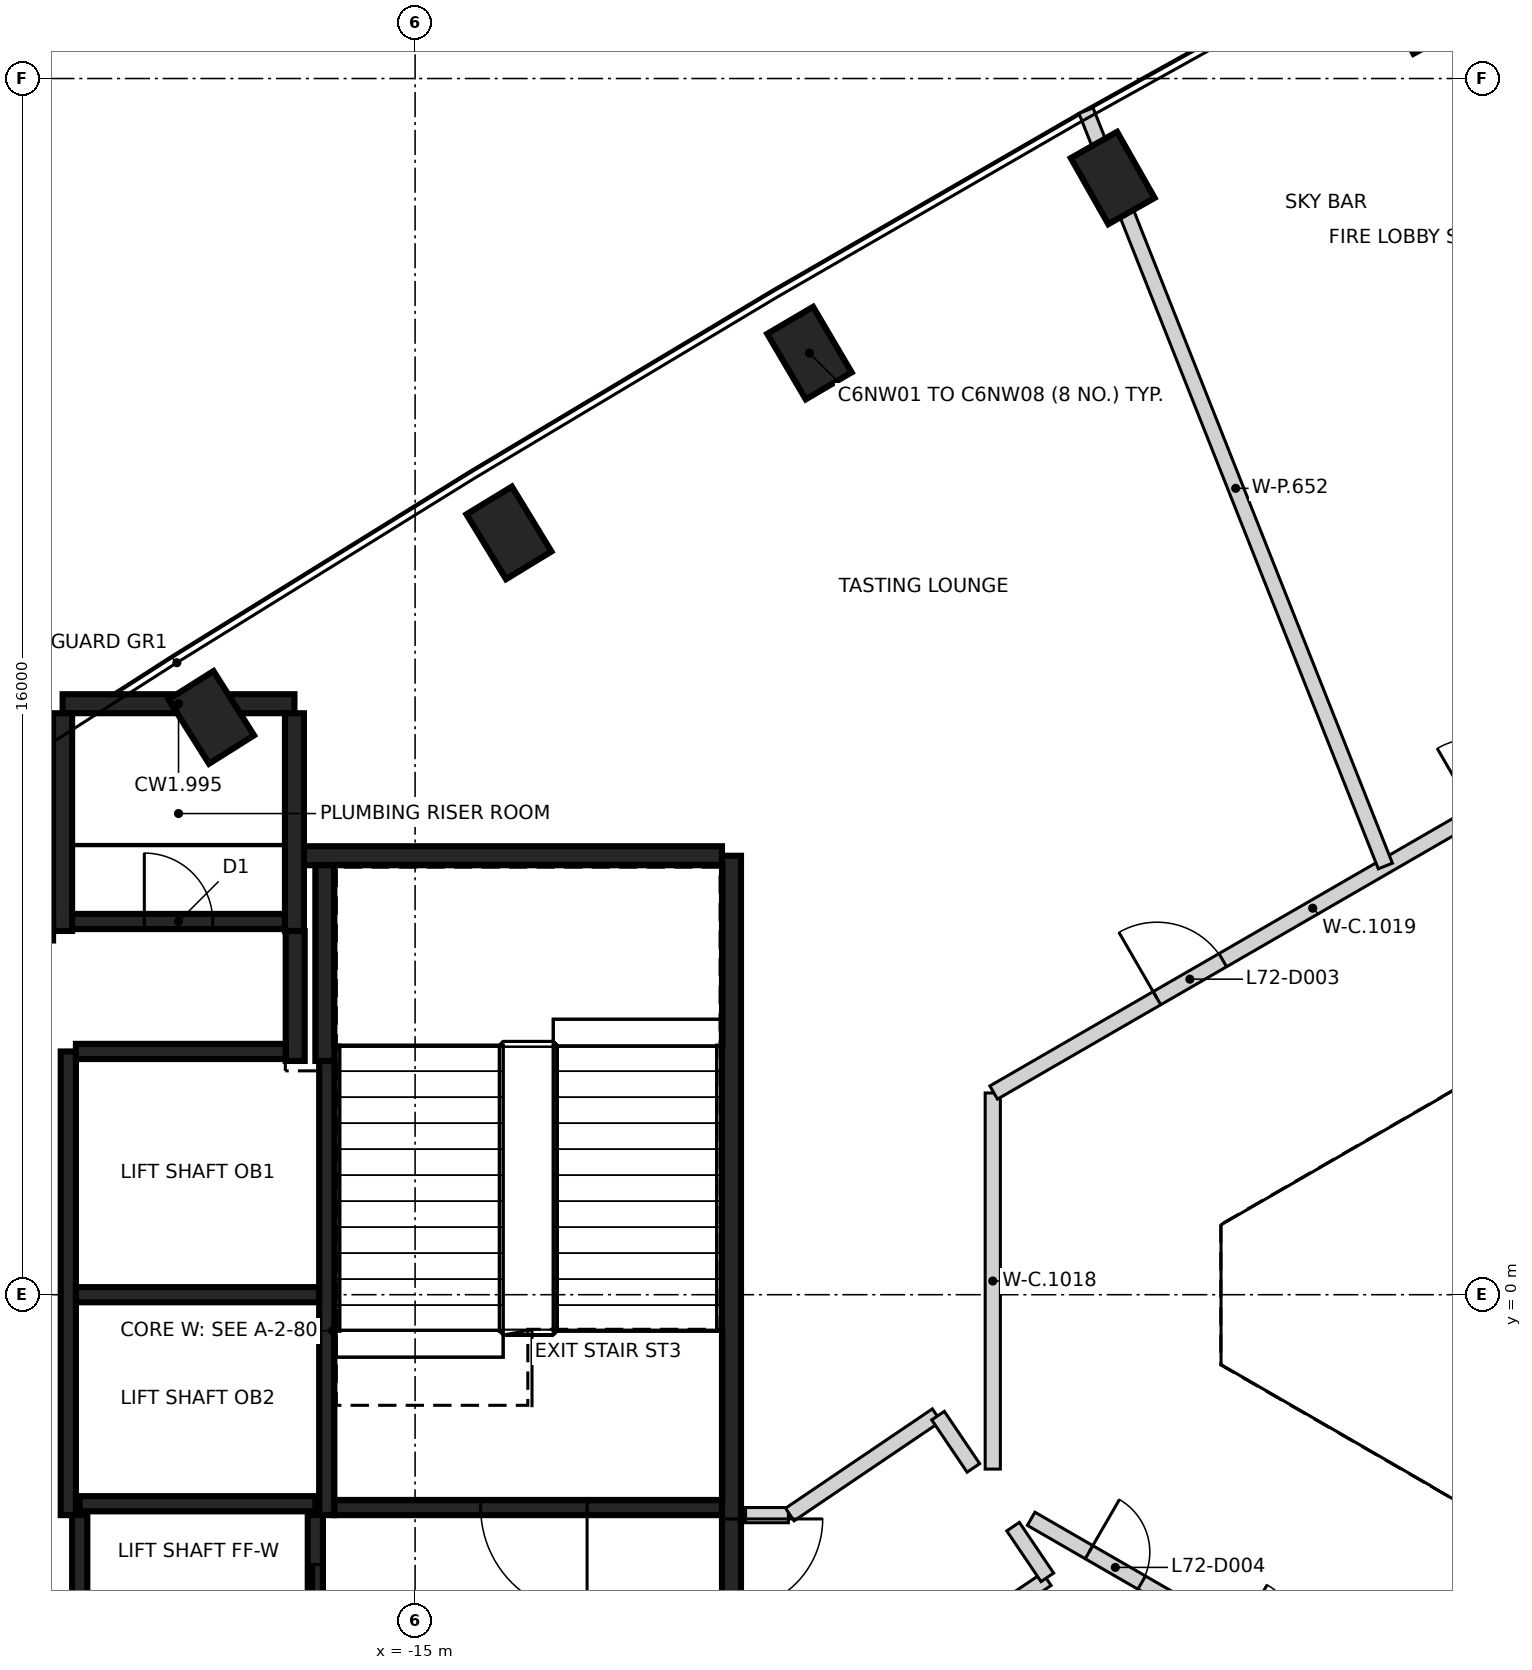
"""IFC4 building model, lengths in metres.
Left out: names, types, materials, properties, quantities, classifications, styles, units other than length and angle.
Written with IfcOpenShell. Run it as: python <this file> out.ifc"""

import sys

from ifc_helpers import new_model, si_unit, direction, frame, frame_2d, origin, origin_2d, place, context, subcontext, project, spatial, rectangle, extrude, element, fill, save


model = new_model("IFC4")
c1 = context("Model", 3, precision=1e-05, world=origin(), true_north=direction((0.0, 1.0)))
c2 = subcontext(c1, "Body", "Model", "MODEL_VIEW")
j1 = project(units=[si_unit("LENGTHUNIT", "METRE"), si_unit("PLANEANGLEUNIT", "RADIAN")], contexts=[c1])
p1 = place(None, origin())
s1 = spatial("IfcSite", under=j1, at=p1, CompositionType="ELEMENT")
p2 = place(p1, origin())
s2 = spatial("IfcBuilding", under=s1, at=p2, CompositionType="ELEMENT")
p3 = place(p2, frame((0.0, 0.0, 283.8)))
s3 = spatial("IfcBuildingStorey", under=s2, at=p3, CompositionType="ELEMENT", Elevation=283.8)
for number, where, z_axis, x_axis in (
    (1, (-1.797, 16.932, -0.35), (0.0, 0.0, 1.0), (-0.479, 0.878, 0.0)),
    (2, (-5.822, 14.691, -0.35), (0.0, 0.0, 1.0), (-0.493, 0.87, 0.0)),
    (3, (-9.812, 12.388, -0.35), (0.0, 0.0, 1.0), (-0.507, 0.862, 0.0)),
    (4, (-13.765, 10.022, -0.35), (0.0, 0.0, 1.0), (-0.52, 0.854, 0.0)),
    (5, (-17.681, 7.595, -0.35), (0.0, 0.0, 1.0), (-0.533, 0.846, 0.0)),
):
    element("IfcColumn", number, at=place(p3, frame(where, z_axis=z_axis, x_axis=x_axis)), inside=s3, PredefinedType="COLUMN", context=c2, shape_type="SweptSolid", body=[
        extrude(rectangle(XDim=1.0, YDim=0.7, at=origin_2d()), origin(), (0.0, 0.0, 1.0), 7.2),
    ])
p4 = place(p3, frame((-10.837, 5.775, 0.0), z_axis=(0.0, 0.0, 1.0), x_axis=(0.0, -1.0, 0.0)))
e6 = element("IfcWall", 6, at=p4, inside=s3, PredefinedType="SHEAR", context=c2, shape_type="SweptSolid", body=[
    extrude(rectangle(XDim=11.55, YDim=0.25, at=frame_2d((5.775, 0.0))), origin(), (0.0, 0.0, 1.0), 6.85),
])
p5 = place(p4, frame((10.025, 0.0, 0.0)))
e7 = element("IfcOpeningElement", 7, at=p5, cuts=e6, PredefinedType="OPENING", context=c2, shape_type="SweptSolid", body=[
    extrude(rectangle(XDim=1.2, YDim=2.1, at=frame_2d((0.6, 1.05))), frame((0.0, 0.135, 0.0), z_axis=(0.0, -1.0, 0.0), x_axis=(1.0, 0.0, 0.0)), (0.0, 0.0, 1.0), 0.27),
])
p6 = place(p4, frame((8.725, 0.0, 0.0)))
e8 = element("IfcOpeningElement", 8, at=p6, cuts=e6, PredefinedType="OPENING", context=c2, shape_type="SweptSolid", body=[
    extrude(rectangle(XDim=1.2, YDim=2.1, at=frame_2d((0.6, 1.05))), frame((0.0, 0.135, 0.0), z_axis=(0.0, -1.0, 0.0), x_axis=(1.0, 0.0, 0.0)), (0.0, 0.0, 1.0), 0.27),
])
p7 = place(p3, frame((-16.472, 5.775, 0.0), z_axis=(0.0, 0.0, 1.0), x_axis=(1.0, 0.0, 0.0)))
e9 = element("IfcWall", 9, at=p7, inside=s3, PredefinedType="SHEAR", context=c2, shape_type="SweptSolid", body=[
    extrude(rectangle(XDim=5.51, YDim=0.25, at=frame_2d((2.755, 0.0))), origin(), (0.0, 0.0, 1.0), 6.85),
])
p8 = place(p3, frame((-19.637, 7.775, 0.0), z_axis=(0.0, 0.0, 1.0), x_axis=(1.0, 0.0, 0.0)))
e10 = element("IfcWall", 10, at=p8, inside=s3, PredefinedType="SHEAR", context=c2, shape_type="SweptSolid", body=[
    extrude(rectangle(XDim=3.05, YDim=0.25, at=frame_2d((1.525, 0.0))), origin(), (0.0, 0.0, 1.0), 6.85),
])
for number, where, z_axis, x_axis in (
    (11, (-16.587, 7.65, 0.0), (0.0, 0.0, 1.0), (0.0, -1.0, 0.0)),
    (12, (-19.637, 4.785, 0.0), (0.0, 0.0, 1.0), (0.0, 1.0, 0.0)),
):
    element("IfcWall", number, at=place(p3, frame(where, z_axis=z_axis, x_axis=x_axis)), inside=s3, PredefinedType="SHEAR", context=c2, shape_type="SweptSolid", body=[
        extrude(rectangle(XDim=2.865, YDim=0.25, at=frame_2d((1.432, 0.0))), origin(), (0.0, 0.0, 1.0), 6.85),
    ])
p9 = place(p3, frame((-16.187, 3.075, 0.0), z_axis=(0.0, 0.0, 1.0), x_axis=(0.0, 1.0, 0.0)))
e13 = element("IfcWall", 13, at=p9, inside=s3, PredefinedType="SHEAR", context=c2, shape_type="SweptSolid", body=[
    extrude(rectangle(XDim=2.575, YDim=0.25, at=frame_2d((1.287, 0.0))), origin(), (0.0, 0.0, 1.0), 6.85),
])
p10 = place(p3, frame((-16.577, 4.785, 0.0), z_axis=(0.0, 0.0, 1.0), x_axis=(0.0, -1.0, 0.0)))
e14 = element("IfcWall", 14, at=p10, inside=s3, PredefinedType="SHEAR", context=c2, shape_type="SweptSolid", body=[
    extrude(rectangle(XDim=1.71, YDim=0.25, at=frame_2d((0.855, 0.0))), origin(), (0.0, 0.0, 1.0), 6.85),
])
p11 = place(p3, frame((-20.322, 4.785, 0.0), z_axis=(0.0, 0.0, 1.0), x_axis=(1.0, 0.0, 0.0)))
e15 = element("IfcWall", 15, at=p11, inside=s3, PredefinedType="SHEAR", context=c2, shape_type="SweptSolid", body=[
    extrude(rectangle(XDim=0.559, YDim=0.25, at=frame_2d((0.28, 0.0))), origin(), (0.0, 0.0, 1.0), 6.85),
])
p12 = place(p3, frame((-16.162, 3.074, 0.0), z_axis=(0.0, 0.0, 1.0), x_axis=(0.0, -1.0, 0.0)))
e16 = element("IfcWall", 16, at=p12, inside=s3, PredefinedType="SHEAR", context=c2, shape_type="SweptSolid", body=[
    extrude(rectangle(XDim=5.974, YDim=0.2, at=frame_2d((2.987, 0.0))), origin(), (0.0, 0.0, 1.0), 6.85),
])
p13 = place(p3, frame((-19.562, -2.9, 0.0), z_axis=(0.0, 0.0, 1.0), x_axis=(0.0, 1.0, 0.0)))
e17 = element("IfcWall", 17, at=p13, inside=s3, PredefinedType="SHEAR", context=c2, shape_type="SweptSolid", body=[
    extrude(rectangle(XDim=6.1, YDim=0.2, at=frame_2d((3.05, 0.0))), origin(), (0.0, 0.0, 1.0), 6.85),
])
p14 = place(p3, frame((-10.963, -2.8, 0.0), z_axis=(0.0, 0.0, 1.0), x_axis=(-1.0, 0.0, 0.0)))
e18 = element("IfcWall", 18, at=p14, inside=s3, PredefinedType="SHEAR", context=c2, shape_type="SweptSolid", body=[
    extrude(rectangle(XDim=5.098, YDim=0.2, at=frame_2d((2.549, 0.0))), origin(), (0.0, 0.0, 1.0), 6.85),
])
p15 = place(p14, frame((1.774, 0.0, 0.0)))
e19 = element("IfcOpeningElement", 19, at=p15, cuts=e18, PredefinedType="OPENING", context=c2, shape_type="SweptSolid", body=[
    extrude(rectangle(XDim=1.4, YDim=2.1, at=frame_2d((0.7, 1.05))), frame((0.0, 0.11, 0.0), z_axis=(0.0, -1.0, 0.0), x_axis=(1.0, 0.0, 0.0)), (0.0, 0.0, 1.0), 0.22),
])
p16 = place(p3, frame((-16.263, 0.0, 0.0), z_axis=(0.0, 0.0, 1.0), x_axis=(-1.0, 0.0, 0.0)))
e20 = element("IfcWall", 20, at=p16, inside=s3, PredefinedType="SHEAR", context=c2, shape_type="SweptSolid", body=[
    extrude(rectangle(XDim=3.198, YDim=0.2, at=frame_2d((1.599, 0.0))), origin(), (0.0, 0.0, 1.0), 6.85),
])
p17 = place(p3, frame((-19.511, 4.91, 0.0), z_axis=(0.0, 0.0, 1.0), x_axis=(1.0, 0.0, 0.0)))
e21 = element("IfcWall", 21, at=p17, inside=s3, PredefinedType="SHEAR", context=c2, shape_type="SweptSolid", body=[
    extrude(rectangle(XDim=2.798, YDim=0.2, at=frame_2d((1.399, 0.0))), origin(), (0.0, 0.0, 1.0), 6.85),
])
p18 = place(p17, frame((0.949, 0.0, 0.0)))
e22 = element("IfcOpeningElement", 22, at=p18, cuts=e21, PredefinedType="OPENING", context=c2, shape_type="SweptSolid", body=[
    extrude(rectangle(XDim=0.9, YDim=2.1, at=frame_2d((0.45, 1.05))), frame((0.0, 0.11, 0.0), z_axis=(0.0, -1.0, 0.0), x_axis=(1.0, 0.0, 0.0)), (0.0, 0.0, 1.0), 0.22),
])
p19 = place(p3, frame((-19.462, 3.2, 0.0), z_axis=(0.0, 0.0, 1.0), x_axis=(1.0, 0.0, 0.0)))
e23 = element("IfcWall", 23, at=p19, inside=s3, PredefinedType="SHEAR", context=c2, shape_type="SweptSolid", body=[
    extrude(rectangle(XDim=2.759, YDim=0.2, at=frame_2d((1.379, 0.0))), origin(), (0.0, 0.0, 1.0), 6.85),
])
p20 = place(p3, frame((-19.412, -2.75, 0.0), z_axis=(0.0, 0.0, 1.0), x_axis=(1.0, 0.0, 0.0)))
e24 = element("IfcWall", 24, at=p20, inside=s3, PredefinedType="SHEAR", context=c2, shape_type="SweptSolid", body=[
    extrude(rectangle(XDim=3.1, YDim=0.2, at=frame_2d((1.55, 0.0))), origin(), (0.0, 0.0, 1.0), 6.85),
])
p21 = place(p3, frame((-16.312, -2.898, 0.0), z_axis=(0.0, 0.0, 1.0), x_axis=(0.0, -1.0, 0.0)))
e25 = element("IfcWall", 25, at=p21, inside=s3, PredefinedType="SHEAR", context=c2, shape_type="SweptSolid", body=[
    extrude(rectangle(XDim=2.651, YDim=0.2, at=frame_2d((1.325, 0.0))), origin(), (0.0, 0.0, 1.0), 6.85),
])
p22 = place(p21, frame((0.652, 0.0, 0.0)))
e26 = element("IfcOpeningElement", 26, at=p22, cuts=e25, PredefinedType="OPENING", context=c2, shape_type="SweptSolid", body=[
    extrude(rectangle(XDim=1.3, YDim=2.1, at=frame_2d((0.65, 1.05))), frame((0.0, 0.11, 0.0), z_axis=(0.0, -1.0, 0.0), x_axis=(1.0, 0.0, 0.0)), (0.0, 0.0, 1.0), 0.22),
])
p23 = place(p3, frame((-19.412, -5.549, 0.0), z_axis=(0.0, 0.0, 1.0), x_axis=(0.0, 1.0, 0.0)))
e27 = element("IfcWall", 27, at=p23, inside=s3, PredefinedType="SHEAR", context=c2, shape_type="SweptSolid", body=[
    extrude(rectangle(XDim=2.651, YDim=0.2, at=frame_2d((1.325, 0.0))), origin(), (0.0, 0.0, 1.0), 6.85),
])
p24 = place(p3, frame((-10.652, -2.9, 0.0), z_axis=(0.0, 0.0, 1.0), x_axis=(1.0, 0.0, 0.0)))
e28 = element("IfcWall", 28, at=p24, inside=s3, PredefinedType="PARTITIONING", context=c2, shape_type="SweptSolid", body=[
    extrude(rectangle(XDim=0.563, YDim=0.2, at=frame_2d((0.282, 0.0))), origin(), (0.0, 0.0, 1.0), 6.85),
])
p25 = place(p3, frame((-10.07, -2.892, 0.0), z_axis=(0.0, 0.0, 1.0), x_axis=(0.828131902324, 0.560533274974, 0.0)))
e29 = element("IfcWall", 29, at=p25, inside=s3, PredefinedType="PARTITIONING", context=c2, shape_type="SweptSolid", body=[
    extrude(rectangle(XDim=2.332, YDim=0.2, at=frame_2d((1.166, 0.0))), origin(), (0.0, 0.0, 1.0), 6.85),
])
p26 = place(p3, frame((-8.646, -5.065, 0.0), z_axis=(0.0, 0.0, 1.0), x_axis=(0.828455481329, 0.560054921821, 0.0)))
e30 = element("IfcWall", 30, at=p26, inside=s3, PredefinedType="PARTITIONING", context=c2, shape_type="SweptSolid", body=[
    extrude(rectangle(XDim=2.362, YDim=0.2, at=frame_2d((1.181, 0.0))), origin(), (0.0, 0.0, 1.0), 6.85),
])
p27 = place(p3, frame((-8.12, -1.591, 0.0), z_axis=(0.0, 0.0, 1.0), x_axis=(0.560048326839, -0.82845993965, 0.0)))
e31 = element("IfcWall", 31, at=p27, inside=s3, PredefinedType="PARTITIONING", context=c2, shape_type="SweptSolid", body=[
    extrude(rectangle(XDim=0.83, YDim=0.2, at=frame_2d((0.415, 0.0))), origin(), (0.0, 0.0, 1.0), 6.85),
])
p28 = place(p3, frame((-7.4, -2.294, 0.0), z_axis=(0.0, 0.0, 1.0), x_axis=(0.0, 1.0, 0.0)))
e32 = element("IfcWall", 32, at=p28, inside=s3, PredefinedType="PARTITIONING", context=c2, shape_type="SweptSolid", body=[
    extrude(rectangle(XDim=4.948, YDim=0.2, at=frame_2d((2.474, 0.0))), origin(), (0.0, 0.0, 1.0), 6.85),
])
p29 = place(p3, frame((-7.388, 2.659, 0.0), z_axis=(0.0, 0.0, 1.0), x_axis=(0.865840346806, 0.500320391192, 0.0)))
e33 = element("IfcWall", 33, at=p29, inside=s3, PredefinedType="PARTITIONING", context=c2, shape_type="SweptSolid", body=[
    extrude(rectangle(XDim=9.695, YDim=0.2, at=frame_2d((4.848, 0.0))), origin(), (0.0, 0.0, 1.0), 6.85),
])
p30 = place(p29, frame((7.318, 0.0, 0.0)))
e34 = element("IfcOpeningElement", 34, at=p30, cuts=e33, PredefinedType="OPENING", context=c2, shape_type="SweptSolid", body=[
    extrude(rectangle(XDim=1.0, YDim=2.1, at=frame_2d((0.5, 1.05))), frame((0.0, 0.11, 0.0), z_axis=(0.0, -1.0, 0.0), x_axis=(1.0, 0.0, 0.0)), (0.0, 0.0, 1.0), 0.22),
])
p31 = place(p29, frame((2.481, 0.0, 0.0)))
e35 = element("IfcOpeningElement", 35, at=p31, cuts=e33, PredefinedType="OPENING", context=c2, shape_type="SweptSolid", body=[
    extrude(rectangle(XDim=1.0, YDim=2.1, at=frame_2d((0.5, 1.05))), frame((0.0, 0.11, 0.0), z_axis=(0.0, -1.0, 0.0), x_axis=(1.0, 0.0, 0.0)), (0.0, 0.0, 1.0), 0.22),
])
p32 = place(p3, frame((-7.133, -3.052, 0.0), z_axis=(0.0, 0.0, 1.0), x_axis=(0.559868666629, -0.828581363613, 0.0)))
e36 = element("IfcWall", 36, at=p32, inside=s3, PredefinedType="PARTITIONING", context=c2, shape_type="SweptSolid", body=[
    extrude(rectangle(XDim=0.805, YDim=0.2, at=frame_2d((0.402, 0.0))), origin(), (0.0, 0.0, 1.0), 6.85),
])
p33 = place(p3, frame((-6.895, -2.948, 0.0), z_axis=(0.0, 0.0, 1.0), x_axis=(0.865991331413, -0.500059010435, 0.0)))
e37 = element("IfcWall", 37, at=p33, inside=s3, PredefinedType="PARTITIONING", context=c2, shape_type="SweptSolid", body=[
    extrude(rectangle(XDim=9.565, YDim=0.2, at=frame_2d((4.783, 0.0))), origin(), (0.0, 0.0, 1.0), 6.85),
])
p34 = place(p33, frame((0.879, 0.0, 0.0)))
e38 = element("IfcOpeningElement", 38, at=p34, cuts=e37, PredefinedType="OPENING", context=c2, shape_type="SweptSolid", body=[
    extrude(rectangle(XDim=0.8, YDim=2.1, at=frame_2d((0.4, 1.05))), frame((0.0, 0.11, 0.0), z_axis=(0.0, -1.0, 0.0), x_axis=(1.0, 0.0, 0.0)), (0.0, 0.0, 1.0), 0.22),
])
p35 = place(p33, frame((3.123, 0.0, 0.0)))
e39 = element("IfcOpeningElement", 39, at=p35, cuts=e37, PredefinedType="OPENING", context=c2, shape_type="SweptSolid", body=[
    extrude(rectangle(XDim=0.8, YDim=2.1, at=frame_2d((0.4, 1.05))), frame((0.0, 0.11, 0.0), z_axis=(0.0, -1.0, 0.0), x_axis=(1.0, 0.0, 0.0)), (0.0, 0.0, 1.0), 0.22),
])
p36 = place(p33, frame((6.526, 0.0, 0.0)))
e40 = element("IfcOpeningElement", 40, at=p36, cuts=e37, PredefinedType="OPENING", context=c2, shape_type="SweptSolid", body=[
    extrude(rectangle(XDim=1.0, YDim=2.1, at=frame_2d((0.5, 1.05))), frame((0.0, 0.11, 0.0), z_axis=(0.0, -1.0, 0.0), x_axis=(1.0, 0.0, 0.0)), (0.0, 0.0, 1.0), 0.22),
])
p37 = place(p3, frame((-6.173, 15.577, 0.0), z_axis=(0.0, 0.0, 1.0), x_axis=(0.368423588366, -0.929658033653, 0.0)))
e41 = element("IfcWall", 41, at=p37, inside=s3, PredefinedType="PARTITIONING", context=c2, shape_type="SweptSolid", body=[
    extrude(rectangle(XDim=10.689, YDim=0.2, at=frame_2d((5.345, 0.0))), origin(), (0.0, 0.0, 1.0), 6.85),
])
p38 = place(p22, origin())
e42 = element("IfcDoor", 42, at=p38, inside=s3, OperationType="SLIDING_TO_RIGHT", PredefinedType="DOOR", context=c2, shape_type="SweptSolid", body=[
    extrude(rectangle(XDim=1.3, YDim=2.1, at=frame_2d((0.65, 1.05))), frame((0.0, 0.025, 0.0), z_axis=(0.0, -1.0, 0.0), x_axis=(1.0, 0.0, 0.0)), (0.0, 0.0, 1.0), 0.05),
])
fill(e26, e42)
p39 = place(p6, origin())
e43 = element("IfcDoor", 43, at=p39, inside=s3, OperationType="SINGLE_SWING_RIGHT", PredefinedType="DOOR", context=c2, shape_type="SweptSolid", body=[
    extrude(rectangle(XDim=1.2, YDim=2.1, at=frame_2d((0.6, 1.05))), frame((0.0, 0.025, 0.0), z_axis=(0.0, -1.0, 0.0), x_axis=(1.0, 0.0, 0.0)), (0.0, 0.0, 1.0), 0.05),
])
fill(e8, e43)
p40 = place(p15, origin())
e44 = element("IfcDoor", 44, at=p40, inside=s3, OperationType="SINGLE_SWING_LEFT", PredefinedType="DOOR", context=c2, shape_type="SweptSolid", body=[
    extrude(rectangle(XDim=1.4, YDim=2.1, at=frame_2d((0.7, 1.05))), frame((0.0, 0.025, 0.0), z_axis=(0.0, -1.0, 0.0), x_axis=(1.0, 0.0, 0.0)), (0.0, 0.0, 1.0), 0.05),
])
fill(e19, e44)
p41 = place(p18, origin())
e45 = element("IfcDoor", 45, at=p41, inside=s3, OperationType="SINGLE_SWING_RIGHT", PredefinedType="DOOR", context=c2, shape_type="SweptSolid", body=[
    extrude(rectangle(XDim=0.9, YDim=2.1, at=frame_2d((0.45, 1.05))), frame((0.0, 0.025, 0.0), z_axis=(0.0, -1.0, 0.0), x_axis=(1.0, 0.0, 0.0)), (0.0, 0.0, 1.0), 0.05),
])
fill(e22, e45)
p42 = place(p31, origin())
e46 = element("IfcDoor", 46, at=p42, inside=s3, OperationType="SINGLE_SWING_LEFT", PredefinedType="DOOR", context=c2, shape_type="SweptSolid", body=[
    extrude(rectangle(XDim=1.0, YDim=2.1, at=frame_2d((0.5, 1.05))), frame((0.0, 0.025, 0.0), z_axis=(0.0, -1.0, 0.0), x_axis=(1.0, 0.0, 0.0)), (0.0, 0.0, 1.0), 0.05),
])
fill(e35, e46)
p43 = place(p34, frame((0.8, 0.0, 0.0), z_axis=(0.0, 0.0, 1.0), x_axis=(-1.0, 0.0, 0.0)))
e47 = element("IfcDoor", 47, at=p43, inside=s3, OperationType="SINGLE_SWING_LEFT", PredefinedType="DOOR", context=c2, shape_type="SweptSolid", body=[
    extrude(rectangle(XDim=0.8, YDim=2.1, at=frame_2d((0.4, 1.05))), frame((0.0, 0.025, 0.0), z_axis=(0.0, -1.0, 0.0), x_axis=(1.0, 0.0, 0.0)), (0.0, 0.0, 1.0), 0.05),
])
fill(e38, e47)
save(model, sys.argv[1])
